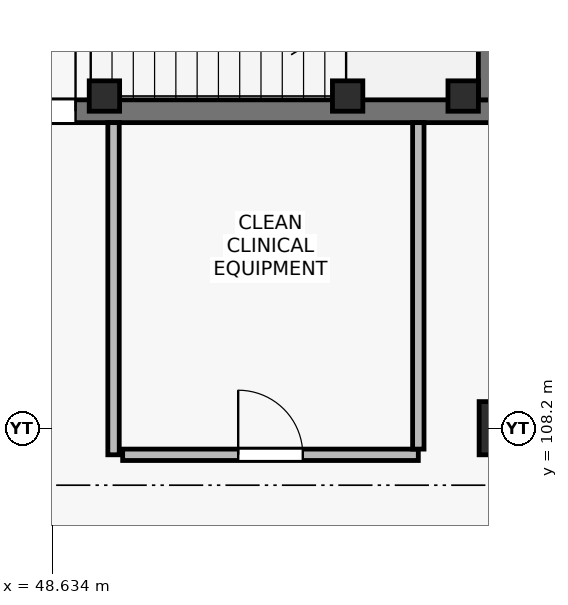
"""IFC4 building model, lengths in metres.
Left out: names, types, materials, properties, quantities, classifications, styles, units other than length and angle.
Written with IfcOpenShell. Run it as: python <this file> out.ifc"""

import sys

from ifc_helpers import new_model, si_unit, direction, frame, frame_2d, origin, origin_2d, place, context, subcontext, project, spatial, rectangle, extrude, element, fill, save


model = new_model("IFC4")
c1 = context("Model", 3, precision=1e-05, world=origin(), true_north=direction((0.0, 1.0)))
c2 = subcontext(c1, "Body", "Model", "MODEL_VIEW")
j1 = project(units=[si_unit("LENGTHUNIT", "METRE"), si_unit("PLANEANGLEUNIT", "RADIAN")], contexts=[c1])
p1 = place(None, origin())
s1 = spatial("IfcSite", under=j1, at=p1, CompositionType="ELEMENT")
p2 = place(p1, origin())
s2 = spatial("IfcBuilding", under=s1, at=p2, CompositionType="ELEMENT")
p3 = place(p2, frame((0.0, 0.0, -4.5)))
s3 = spatial("IfcBuildingStorey", under=s2, at=p3, CompositionType="ELEMENT", Elevation=-4.5)
p4 = place(p3, frame((54.6, 108.2, 0.0), z_axis=(0.0, 0.0, 1.0), x_axis=(1.0, 0.0, 0.0)))
e1 = element("IfcColumn", 1, at=p4, inside=s3, PredefinedType="COLUMN", context=c2, shape_type="SweptSolid", body=[
    extrude(rectangle(XDim=0.7, YDim=0.7, at=origin_2d()), origin(), (0.0, 0.0, 1.0), 4.5),
])
for number, where, z_axis, x_axis in (
    (2, (49.32, 112.57, 0.0), (0.0, 0.0, 1.0), (1.0, 0.0, 0.0)),
    (3, (52.52, 112.57, 0.0), (0.0, 0.0, 1.0), (1.0, 0.0, 0.0)),
    (4, (54.04, 112.57, 0.0), (0.0, 0.0, 1.0), (1.0, 0.0, 0.0)),
):
    element("IfcColumn", number, at=place(p3, frame(where, z_axis=z_axis, x_axis=x_axis)), inside=s3, PredefinedType="COLUMN", context=c2, shape_type="SweptSolid", body=[
        extrude(rectangle(XDim=0.4, YDim=0.4, at=origin_2d()), origin(), (0.0, 0.0, 1.0), 4.5),
    ])
p5 = place(p3, frame((46.95, 112.37, 0.0), z_axis=(0.0, 0.0, 1.0), x_axis=(1.0, 0.0, 0.0)))
e5 = element("IfcWall", 5, at=p5, inside=s3, PredefinedType="SHEAR", context=c2, shape_type="SweptSolid", body=[
    extrude(rectangle(XDim=7.59, YDim=0.3, at=frame_2d((3.795, 0.0))), origin(), (0.0, 0.0, 1.0), 4.2),
])
p6 = place(p5, frame((0.59, 0.0, 0.0)))
e6 = element("IfcOpeningElement", 6, at=p6, cuts=e5, PredefinedType="OPENING", context=c2, shape_type="SweptSolid", body=[
    extrude(rectangle(XDim=1.4, YDim=2.2, at=frame_2d((0.7, 1.1))), frame((0.0, 0.16, 0.0), z_axis=(0.0, -1.0, 0.0), x_axis=(1.0, 0.0, 0.0)), (0.0, 0.0, 1.0), 0.32),
])
p7 = place(p3, frame((54.39, 112.52, 0.0), z_axis=(0.0, 0.0, 1.0), x_axis=(0.0, 1.0, 0.0)))
e7 = element("IfcWall", 7, at=p7, inside=s3, PredefinedType="SHEAR", context=c2, shape_type="SweptSolid", body=[
    extrude(rectangle(XDim=3.33, YDim=0.3, at=frame_2d((1.665, 0.0))), origin(), (0.0, 0.0, 1.0), 4.2),
])
p8 = place(p3, frame((49.44, 107.85, 0.0), z_axis=(0.0, 0.0, 1.0), x_axis=(0.0, 1.0, 0.0)))
e8 = element("IfcWall", 8, at=p8, inside=s3, PredefinedType="PARTITIONING", context=c2, shape_type="SweptSolid", body=[
    extrude(rectangle(XDim=4.37, YDim=0.15, at=frame_2d((2.185, 0.0))), origin(), (0.0, 0.0, 1.0), 4.2),
])
p9 = place(p3, frame((49.56, 107.85, 0.0), z_axis=(0.0, 0.0, 1.0), x_axis=(1.0, 0.0, 0.0)))
e9 = element("IfcWall", 9, at=p9, inside=s3, PredefinedType="PARTITIONING", context=c2, shape_type="SweptSolid", body=[
    extrude(rectangle(XDim=3.89, YDim=0.15, at=frame_2d((1.945, 0.0))), origin(), (0.0, 0.0, 1.0), 3.71),
])
p10 = place(p9, frame((1.52, 0.0, 0.0)))
e10 = element("IfcOpeningElement", 10, at=p10, cuts=e9, PredefinedType="OPENING", context=c2, shape_type="SweptSolid", body=[
    extrude(rectangle(XDim=0.85, YDim=2.1, at=frame_2d((0.425, 1.05))), frame((0.0, 0.085, 0.0), z_axis=(0.0, -1.0, 0.0), x_axis=(1.0, 0.0, 0.0)), (0.0, 0.0, 1.0), 0.17),
])
p11 = place(p3, frame((53.45, 107.925, 0.0), z_axis=(0.0, 0.0, 1.0), x_axis=(0.0, 1.0, 0.0)))
e11 = element("IfcWall", 11, at=p11, inside=s3, PredefinedType="PARTITIONING", context=c2, shape_type="SweptSolid", body=[
    extrude(rectangle(XDim=4.295, YDim=0.15, at=frame_2d((2.147, 0.0))), origin(), (0.0, 0.0, 1.0), 4.2),
])
p12 = place(p6, origin())
e12 = element("IfcDoor", 12, at=p12, inside=s3, OperationType="SINGLE_SWING_RIGHT", PredefinedType="DOOR", context=c2, shape_type="SweptSolid", body=[
    extrude(rectangle(XDim=1.4, YDim=2.2, at=frame_2d((0.7, 1.1))), frame((0.0, 0.025, 0.0), z_axis=(0.0, -1.0, 0.0), x_axis=(1.0, 0.0, 0.0)), (0.0, 0.0, 1.0), 0.05),
])
fill(e6, e12)
p13 = place(p10, origin())
e13 = element("IfcDoor", 13, at=p13, inside=s3, OperationType="SINGLE_SWING_LEFT", PredefinedType="DOOR", context=c2, shape_type="SweptSolid", body=[
    extrude(rectangle(XDim=0.85, YDim=2.1, at=frame_2d((0.425, 1.05))), frame((0.0, 0.025, 0.0), z_axis=(0.0, -1.0, 0.0), x_axis=(1.0, 0.0, 0.0)), (0.0, 0.0, 1.0), 0.05),
])
fill(e10, e13)
save(model, sys.argv[1])
